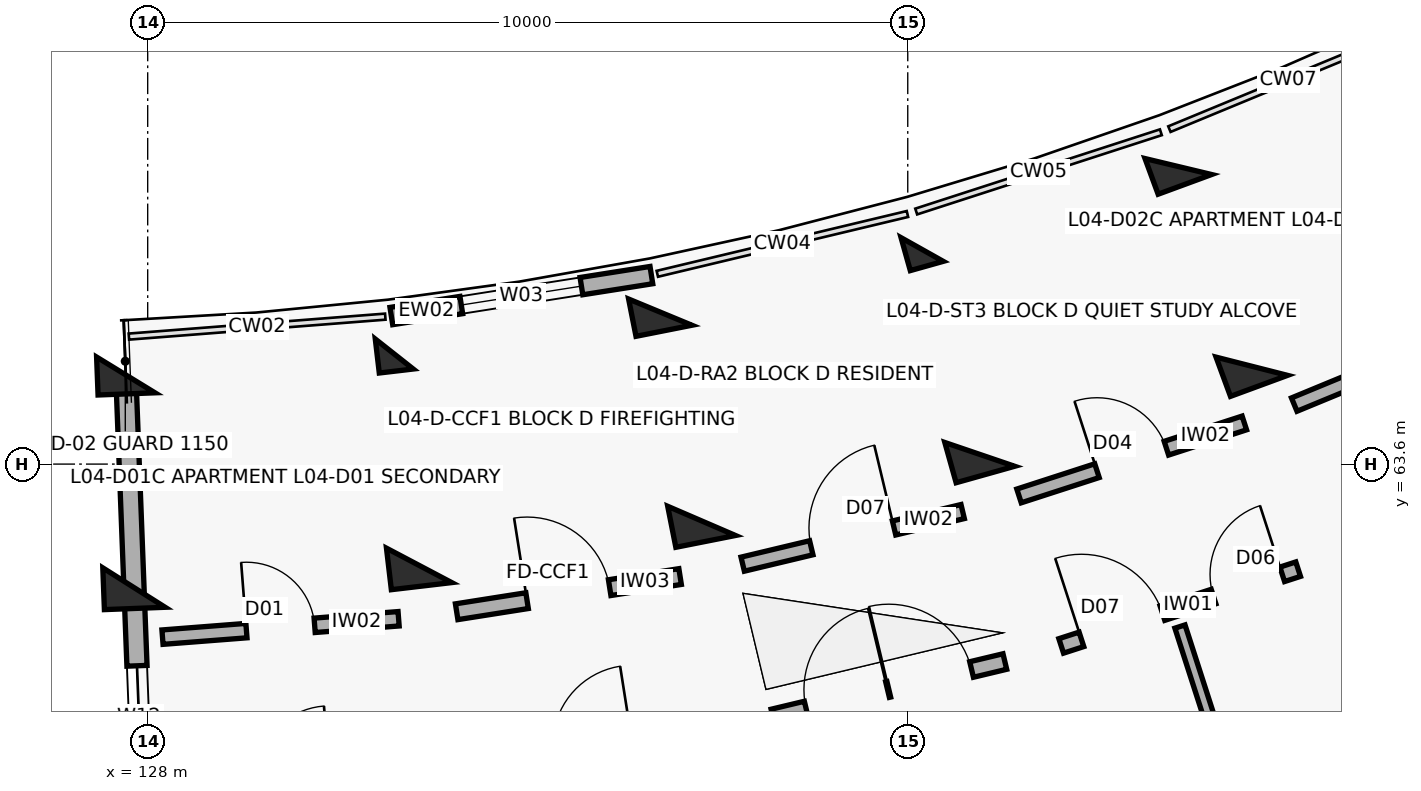
"""IFC4 building model, lengths in metres.
Left out: names, types, materials, properties, quantities, classifications, styles, units other than length and angle.
Written with IfcOpenShell. Run it as: python <this file> out.ifc"""

import sys

from ifc_helpers import new_model, si_unit, direction, frame, frame_2d, origin, origin_2d, place, context, subcontext, project, spatial, rectangle, extrude, element, fill, save


model = new_model("IFC4")
c1 = context("Model", 3, precision=1e-05, world=origin(), true_north=direction((0.0, 1.0)))
c2 = subcontext(c1, "Body", "Model", "MODEL_VIEW")
j1 = project(units=[si_unit("LENGTHUNIT", "METRE"), si_unit("PLANEANGLEUNIT", "RADIAN")], contexts=[c1])
p1 = place(None, origin())
s1 = spatial("IfcSite", under=j1, at=p1, CompositionType="ELEMENT")
p2 = place(p1, origin())
s2 = spatial("IfcBuilding", under=s1, at=p2, CompositionType="ELEMENT")
p3 = place(p2, frame((0.0, 0.0, 14.3)))
s3 = spatial("IfcBuildingStorey", under=s2, at=p3, CompositionType="ELEMENT", Elevation=14.3)
p4 = place(p3, frame((127.712, 64.773, 0.0), z_axis=(0.0, 0.0, 1.0), x_axis=(0.038387809088, -0.999262916411, 0.0)))
e1 = element("IfcColumn", 1, at=p4, inside=s3, PredefinedType="COLUMN", context=c2, shape_type="SweptSolid", body=[
    extrude(rectangle(XDim=0.5, YDim=0.75, at=origin_2d()), origin(), (0.0, 0.0, 1.0), 3.1),
])
p5 = place(p3, frame((127.82, 61.975, 0.0), z_axis=(0.0, 0.0, 1.0), x_axis=(0.038387809088, -0.999262916411, 0.0)))
e2 = element("IfcColumn", 2, at=p5, inside=s3, PredefinedType="COLUMN", context=c2, shape_type="SweptSolid", body=[
    extrude(rectangle(XDim=0.55, YDim=0.8, at=origin_2d()), origin(), (0.0, 0.0, 1.0), 3.1),
])
p6 = place(p3, frame((131.244, 65.048, 0.0), z_axis=(0.0, 0.0, 1.0), x_axis=(0.116670737099, -0.993170649538, 0.0)))
e3 = element("IfcColumn", 3, at=p6, inside=s3, PredefinedType="COLUMN", context=c2, shape_type="SweptSolid", body=[
    extrude(rectangle(XDim=0.45, YDim=0.45, at=origin_2d()), origin(), (0.0, 0.0, 1.0), 3.1),
])
p7 = place(p3, frame((131.571, 62.267, 0.0), z_axis=(0.0, 0.0, 1.0), x_axis=(0.116670737099, -0.993170649538, 0.0)))
e4 = element("IfcColumn", 4, at=p7, inside=s3, PredefinedType="COLUMN", context=c2, shape_type="SweptSolid", body=[
    extrude(rectangle(XDim=0.55, YDim=0.8, at=origin_2d()), origin(), (0.0, 0.0, 1.0), 3.1),
])
p8 = place(p3, frame((134.744, 65.599, 0.0), z_axis=(0.0, 0.0, 1.0), x_axis=(0.19423435122, -0.980955155349, 0.0)))
e5 = element("IfcColumn", 5, at=p8, inside=s3, PredefinedType="COLUMN", context=c2, shape_type="SweptSolid", body=[
    extrude(rectangle(XDim=0.5, YDim=0.75, at=origin_2d()), origin(), (0.0, 0.0, 1.0), 3.1),
])
p9 = place(p3, frame((135.288, 62.853, 0.0), z_axis=(0.0, 0.0, 1.0), x_axis=(0.19423435122, -0.980955155349, 0.0)))
e6 = element("IfcColumn", 6, at=p9, inside=s3, PredefinedType="COLUMN", context=c2, shape_type="SweptSolid", body=[
    extrude(rectangle(XDim=0.55, YDim=0.8, at=origin_2d()), origin(), (0.0, 0.0, 1.0), 3.1),
])
p10 = place(p3, frame((138.189, 66.423, 0.0), z_axis=(0.0, 0.0, 1.0), x_axis=(0.270600445976, -0.962691746426, 0.0)))
e7 = element("IfcColumn", 7, at=p10, inside=s3, PredefinedType="COLUMN", context=c2, shape_type="SweptSolid", body=[
    extrude(rectangle(XDim=0.45, YDim=0.45, at=origin_2d()), origin(), (0.0, 0.0, 1.0), 3.1),
])
p11 = place(p3, frame((138.947, 63.728, 0.0), z_axis=(0.0, 0.0, 1.0), x_axis=(0.270600445976, -0.962691746426, 0.0)))
e8 = element("IfcColumn", 8, at=p11, inside=s3, PredefinedType="COLUMN", context=c2, shape_type="SweptSolid", body=[
    extrude(rectangle(XDim=0.55, YDim=0.8, at=origin_2d()), origin(), (0.0, 0.0, 1.0), 3.1),
])
p12 = place(p3, frame((141.56, 67.515, 0.0), z_axis=(0.0, 0.0, 1.0), x_axis=(0.345298198999, -0.93849302276, 0.0)))
e9 = element("IfcColumn", 9, at=p12, inside=s3, PredefinedType="COLUMN", context=c2, shape_type="SweptSolid", body=[
    extrude(rectangle(XDim=0.5, YDim=0.75, at=origin_2d()), origin(), (0.0, 0.0, 1.0), 3.1),
])
p13 = place(p3, frame((142.527, 64.887, 0.0), z_axis=(0.0, 0.0, 1.0), x_axis=(0.345298198999, -0.93849302276, 0.0)))
e10 = element("IfcColumn", 10, at=p13, inside=s3, PredefinedType="COLUMN", context=c2, shape_type="SweptSolid", body=[
    extrude(rectangle(XDim=0.55, YDim=0.8, at=origin_2d()), origin(), (0.0, 0.0, 1.0), 3.1),
])
p14 = place(p3, frame((131.206, 65.548, 0.0), z_axis=(0.0, 0.0, 1.0), x_axis=(0.987825183084, 0.155568016203, 0.0)))
e11 = element("IfcWall", 11, at=p14, inside=s3, PredefinedType="SOLIDWALL", context=c2, shape_type="SweptSolid", body=[
    extrude(rectangle(XDim=3.464, YDim=0.23, at=frame_2d((1.732, 0.0))), origin(), (0.0, 0.0, 1.0), 2.25),
])
p15 = place(p14, frame((0.932, 0.0, 0.32)))
e12 = element("IfcOpeningElement", 12, at=p15, cuts=e11, PredefinedType="OPENING", context=c2, shape_type="SweptSolid", body=[
    extrude(rectangle(XDim=1.6, YDim=1.5, at=frame_2d((0.8, 0.75))), frame((0.0, 0.125, 0.0), z_axis=(0.0, -1.0, 0.0), x_axis=(1.0, 0.0, 0.0)), (0.0, 0.0, 1.0), 0.25),
])
p16 = place(p3, frame((127.721, 64.533, 0.0), z_axis=(0.0, 0.0, 1.0), x_axis=(0.038407966241, -0.999262141847, 0.0)))
e13 = element("IfcWall", 13, at=p16, inside=s3, PredefinedType="SOLIDWALL", context=c2, shape_type="SweptSolid", body=[
    extrude(rectangle(XDim=8.2, YDim=0.265, at=frame_2d((4.1, 0.0))), origin(), (0.0, 0.0, 1.0), 2.08),
])
p17 = place(p16, frame((3.59, 0.0, 0.75)))
e14 = element("IfcOpeningElement", 14, at=p17, cuts=e13, PredefinedType="OPENING", context=c2, shape_type="SweptSolid", body=[
    extrude(rectangle(XDim=1.35, YDim=1.35, at=frame_2d((0.675, 0.675))), frame((0.0, 0.142, 0.0), z_axis=(0.0, -1.0, 0.0), x_axis=(1.0, 0.0, 0.0)), (0.0, 0.0, 1.0), 0.285),
])
p18 = place(p3, frame((128.195, 61.323, 0.0), z_axis=(0.0, 0.0, 1.0), x_axis=(0.996987280187, 0.077565218655, 0.0)))
e15 = element("IfcWall", 15, at=p18, inside=s3, PredefinedType="SOLIDWALL", context=c2, shape_type="SweptSolid", body=[
    extrude(rectangle(XDim=3.116, YDim=0.19, at=frame_2d((1.558, 0.0))), origin(), (0.0, 0.0, 1.0), 2.08),
])
p19 = place(p18, frame((1.108, 0.0, 0.0)))
e16 = element("IfcOpeningElement", 16, at=p19, cuts=e15, PredefinedType="OPENING", context=c2, shape_type="SweptSolid", body=[
    extrude(rectangle(XDim=0.9, YDim=2.1, at=frame_2d((0.45, 1.05))), frame((0.0, 0.105, 0.0), z_axis=(0.0, -1.0, 0.0), x_axis=(1.0, 0.0, 0.0)), (0.0, 0.0, 1.0), 0.21),
])
p20 = place(p3, frame((132.065, 61.657, 0.0), z_axis=(0.0, 0.0, 1.0), x_axis=(0.987816121487, 0.155625544594, 0.0)))
e17 = element("IfcWall", 17, at=p20, inside=s3, PredefinedType="SOLIDWALL", context=c2, shape_type="SweptSolid", body=[
    extrude(rectangle(XDim=2.976, YDim=0.21, at=frame_2d((1.488, 0.0))), origin(), (0.0, 0.0, 1.0), 2.08),
])
p21 = place(p20, frame((0.938, 0.0, 0.0)))
e18 = element("IfcOpeningElement", 18, at=p21, cuts=e17, PredefinedType="OPENING", context=c2, shape_type="SweptSolid", body=[
    extrude(rectangle(XDim=1.1, YDim=2.15, at=frame_2d((0.55, 1.075))), frame((0.0, 0.115, 0.0), z_axis=(0.0, -1.0, 0.0), x_axis=(1.0, 0.0, 0.0)), (0.0, 0.0, 1.0), 0.23),
])
p22 = place(p3, frame((136.227, 60.272, 0.0), z_axis=(0.0, 0.0, 1.0), x_axis=(0.972564346632, 0.232634029456, 0.0)))
e19 = element("IfcWall", 19, at=p22, inside=s3, PredefinedType="SOLIDWALL", context=c2, shape_type="SweptSolid", body=[
    extrude(rectangle(XDim=3.137, YDim=0.21, at=frame_2d((1.568, 0.0))), origin(), (0.0, 0.0, 1.0), 2.08),
])
p23 = place(p22, frame((0.45, 0.0, 0.0)))
e20 = element("IfcOpeningElement", 20, at=p23, cuts=e19, PredefinedType="OPENING", context=c2, shape_type="SweptSolid", body=[
    extrude(rectangle(XDim=1.1, YDim=2.15, at=frame_2d((0.55, 1.075))), frame((0.0, 0.115, 0.0), z_axis=(0.0, -1.0, 0.0), x_axis=(1.0, 0.0, 0.0)), (0.0, 0.0, 1.0), 0.23),
])
p24 = place(p22, frame((1.567, 0.0, 0.0)))
e21 = element("IfcOpeningElement", 21, at=p24, cuts=e19, PredefinedType="OPENING", context=c2, shape_type="SweptSolid", body=[
    extrude(rectangle(XDim=1.12, YDim=2.15, at=frame_2d((0.56, 1.075))), frame((0.0, 0.115, 0.0), z_axis=(0.0, -1.0, 0.0), x_axis=(1.0, 0.0, 0.0)), (0.0, 0.0, 1.0), 0.23),
])
p25 = place(p3, frame((135.828, 62.283, 0.0), z_axis=(0.0, 0.0, 1.0), x_axis=(0.972558314217, 0.232659247501, 0.0)))
e22 = element("IfcWall", 22, at=p25, inside=s3, PredefinedType="SOLIDWALL", context=c2, shape_type="SweptSolid", body=[
    extrude(rectangle(XDim=2.976, YDim=0.19, at=frame_2d((1.488, 0.0))), origin(), (0.0, 0.0, 1.0), 2.08),
])
p26 = place(p25, frame((0.928, 0.0, 0.0)))
e23 = element("IfcOpeningElement", 23, at=p26, cuts=e22, PredefinedType="OPENING", context=c2, shape_type="SweptSolid", body=[
    extrude(rectangle(XDim=1.12, YDim=2.15, at=frame_2d((0.56, 1.075))), frame((0.0, 0.105, 0.0), z_axis=(0.0, -1.0, 0.0), x_axis=(1.0, 0.0, 0.0)), (0.0, 0.0, 1.0), 0.21),
])
p27 = place(p3, frame((140.019, 61.208, 0.0), z_axis=(0.0, 0.0, 1.0), x_axis=(0.951323803878, 0.308193154005, 0.0)))
e24 = element("IfcWall", 24, at=p27, inside=s3, PredefinedType="SOLIDWALL", context=c2, shape_type="SweptSolid", body=[
    extrude(rectangle(XDim=3.277, YDim=0.2, at=frame_2d((1.639, 0.0))), origin(), (0.0, 0.0, 1.0), 2.08),
])
p28 = place(p27, frame((0.28, 0.0, 0.0)))
e25 = element("IfcOpeningElement", 25, at=p28, cuts=e24, PredefinedType="OPENING", context=c2, shape_type="SweptSolid", body=[
    extrude(rectangle(XDim=1.12, YDim=2.15, at=frame_2d((0.56, 1.075))), frame((0.0, 0.11, 0.0), z_axis=(0.0, -1.0, 0.0), x_axis=(1.0, 0.0, 0.0)), (0.0, 0.0, 1.0), 0.22),
])
p29 = place(p27, frame((2.107, 0.0, 0.0)))
e26 = element("IfcOpeningElement", 26, at=p29, cuts=e24, PredefinedType="OPENING", context=c2, shape_type="SweptSolid", body=[
    extrude(rectangle(XDim=0.95, YDim=2.1, at=frame_2d((0.475, 1.05))), frame((0.0, 0.11, 0.0), z_axis=(0.0, -1.0, 0.0), x_axis=(1.0, 0.0, 0.0)), (0.0, 0.0, 1.0), 0.22),
])
p30 = place(p3, frame((139.464, 63.181, 0.0), z_axis=(0.0, 0.0, 1.0), x_axis=(0.951336474448, 0.308154040027, 0.0)))
e27 = element("IfcWall", 27, at=p30, inside=s3, PredefinedType="SOLIDWALL", context=c2, shape_type="SweptSolid", body=[
    extrude(rectangle(XDim=3.116, YDim=0.19, at=frame_2d((1.558, 0.0))), origin(), (0.0, 0.0, 1.0), 2.08),
])
p31 = place(p30, frame((1.078, 0.0, 0.0)))
e28 = element("IfcOpeningElement", 28, at=p31, cuts=e27, PredefinedType="OPENING", context=c2, shape_type="SweptSolid", body=[
    extrude(rectangle(XDim=0.96, YDim=2.1, at=frame_2d((0.48, 1.05))), frame((0.0, 0.105, 0.0), z_axis=(0.0, -1.0, 0.0), x_axis=(1.0, 0.0, 0.0)), (0.0, 0.0, 1.0), 0.21),
])
p32 = place(p3, frame((141.581, 61.462, 0.0), z_axis=(0.0, 0.0, 1.0), x_axis=(0.306824216212, -0.951766200464, 0.0)))
e29 = element("IfcWall", 29, at=p32, inside=s3, PredefinedType="PARTITIONING", context=c2, shape_type="SweptSolid", body=[
    extrude(rectangle(XDim=7.95, YDim=0.14, at=frame_2d((3.975, 0.0))), origin(), (0.0, 0.0, 1.0), 2.08),
])
p33 = place(p32, frame((6.05, 0.0, 0.0)))
e30 = element("IfcOpeningElement", 30, at=p33, cuts=e29, PredefinedType="OPENING", context=c2, shape_type="SweptSolid", body=[
    extrude(rectangle(XDim=0.92, YDim=2.1, at=frame_2d((0.46, 1.05))), frame((0.0, 0.08, 0.0), z_axis=(0.0, -1.0, 0.0), x_axis=(1.0, 0.0, 0.0)), (0.0, 0.0, 1.0), 0.16),
])
p34 = place(p3, frame((143.085, 64.383, 0.0), z_axis=(0.0, 0.0, 1.0), x_axis=(0.924213340202, 0.381876553081, 0.0)))
e31 = element("IfcWall", 31, at=p34, inside=s3, PredefinedType="SOLIDWALL", context=c2, shape_type="SweptSolid", body=[
    extrude(rectangle(XDim=3.116, YDim=0.19, at=frame_2d((1.558, 0.0))), origin(), (0.0, 0.0, 1.0), 2.08),
])
p35 = place(p34, frame((1.108, 0.0, 0.0)))
e32 = element("IfcOpeningElement", 32, at=p35, cuts=e31, PredefinedType="OPENING", context=c2, shape_type="SweptSolid", body=[
    extrude(rectangle(XDim=0.9, YDim=2.1, at=frame_2d((0.45, 1.05))), frame((0.0, 0.105, 0.0), z_axis=(0.0, -1.0, 0.0), x_axis=(1.0, 0.0, 0.0)), (0.0, 0.0, 1.0), 0.21),
])
p36 = place(p15, origin())
e33 = element("IfcWindow", 33, at=p36, inside=s3, PartitioningType="DOUBLE_PANEL_VERTICAL", PredefinedType="WINDOW", context=c2, shape_type="SweptSolid", body=[
    extrude(rectangle(XDim=1.6, YDim=1.5, at=frame_2d((0.8, 0.75))), frame((0.0, 0.03, 0.0), z_axis=(0.0, -1.0, 0.0), x_axis=(1.0, 0.0, 0.0)), (0.0, 0.0, 1.0), 0.06),
])
fill(e12, e33)
p37 = place(p17, origin())
e34 = element("IfcWindow", 34, at=p37, inside=s3, PartitioningType="DOUBLE_PANEL_VERTICAL", PredefinedType="WINDOW", context=c2, shape_type="SweptSolid", body=[
    extrude(rectangle(XDim=1.35, YDim=1.35, at=frame_2d((0.675, 0.675))), frame((0.0, 0.03, 0.0), z_axis=(0.0, -1.0, 0.0), x_axis=(1.0, 0.0, 0.0)), (0.0, 0.0, 1.0), 0.06),
])
fill(e14, e34)
p38 = place(p19, origin())
e35 = element("IfcDoor", 35, at=p38, inside=s3, OperationType="SINGLE_SWING_LEFT", PredefinedType="DOOR", context=c2, shape_type="SweptSolid", body=[
    extrude(rectangle(XDim=0.9, YDim=2.1, at=frame_2d((0.45, 1.05))), frame((0.0, 0.025, 0.0), z_axis=(0.0, -1.0, 0.0), x_axis=(1.0, 0.0, 0.0)), (0.0, 0.0, 1.0), 0.05),
])
fill(e16, e35)
p39 = place(p21, origin())
e36 = element("IfcDoor", 36, at=p39, inside=s3, OperationType="SINGLE_SWING_LEFT", PredefinedType="DOOR", context=c2, shape_type="SweptSolid", body=[
    extrude(rectangle(XDim=1.1, YDim=2.15, at=frame_2d((0.55, 1.075))), frame((0.0, 0.025, 0.0), z_axis=(0.0, -1.0, 0.0), x_axis=(1.0, 0.0, 0.0)), (0.0, 0.0, 1.0), 0.05),
])
fill(e18, e36)
p40 = place(p23, origin())
e37 = element("IfcDoor", 37, at=p40, inside=s3, OperationType="SINGLE_SWING_RIGHT", PredefinedType="DOOR", context=c2, shape_type="SweptSolid", body=[
    extrude(rectangle(XDim=1.1, YDim=2.15, at=frame_2d((0.55, 1.075))), frame((0.0, 0.025, 0.0), z_axis=(0.0, -1.0, 0.0), x_axis=(1.0, 0.0, 0.0)), (0.0, 0.0, 1.0), 0.05),
])
fill(e20, e37)
p41 = place(p24, origin())
e38 = element("IfcDoor", 38, at=p41, inside=s3, OperationType="SINGLE_SWING_LEFT", PredefinedType="DOOR", context=c2, shape_type="SweptSolid", body=[
    extrude(rectangle(XDim=1.12, YDim=2.15, at=frame_2d((0.56, 1.075))), frame((0.0, 0.025, 0.0), z_axis=(0.0, -1.0, 0.0), x_axis=(1.0, 0.0, 0.0)), (0.0, 0.0, 1.0), 0.05),
])
fill(e21, e38)
p42 = place(p26, origin())
e39 = element("IfcDoor", 39, at=p42, inside=s3, OperationType="SINGLE_SWING_RIGHT", PredefinedType="DOOR", context=c2, shape_type="SweptSolid", body=[
    extrude(rectangle(XDim=1.12, YDim=2.15, at=frame_2d((0.56, 1.075))), frame((0.0, 0.025, 0.0), z_axis=(0.0, -1.0, 0.0), x_axis=(1.0, 0.0, 0.0)), (0.0, 0.0, 1.0), 0.05),
])
fill(e23, e39)
p43 = place(p28, origin())
e40 = element("IfcDoor", 40, at=p43, inside=s3, OperationType="SINGLE_SWING_LEFT", PredefinedType="DOOR", context=c2, shape_type="SweptSolid", body=[
    extrude(rectangle(XDim=1.12, YDim=2.15, at=frame_2d((0.56, 1.075))), frame((0.0, 0.025, 0.0), z_axis=(0.0, -1.0, 0.0), x_axis=(1.0, 0.0, 0.0)), (0.0, 0.0, 1.0), 0.05),
])
fill(e25, e40)
p44 = place(p29, origin())
e41 = element("IfcDoor", 41, at=p44, inside=s3, OperationType="SINGLE_SWING_RIGHT", PredefinedType="DOOR", context=c2, shape_type="SweptSolid", body=[
    extrude(rectangle(XDim=0.95, YDim=2.1, at=frame_2d((0.475, 1.05))), frame((0.0, 0.025, 0.0), z_axis=(0.0, -1.0, 0.0), x_axis=(1.0, 0.0, 0.0)), (0.0, 0.0, 1.0), 0.05),
])
fill(e26, e41)
p45 = place(p31, origin())
e42 = element("IfcDoor", 42, at=p45, inside=s3, OperationType="SINGLE_SWING_LEFT", PredefinedType="DOOR", context=c2, shape_type="SweptSolid", body=[
    extrude(rectangle(XDim=0.96, YDim=2.1, at=frame_2d((0.48, 1.05))), frame((0.0, 0.025, 0.0), z_axis=(0.0, -1.0, 0.0), x_axis=(1.0, 0.0, 0.0)), (0.0, 0.0, 1.0), 0.05),
])
fill(e28, e42)
save(model, sys.argv[1])
